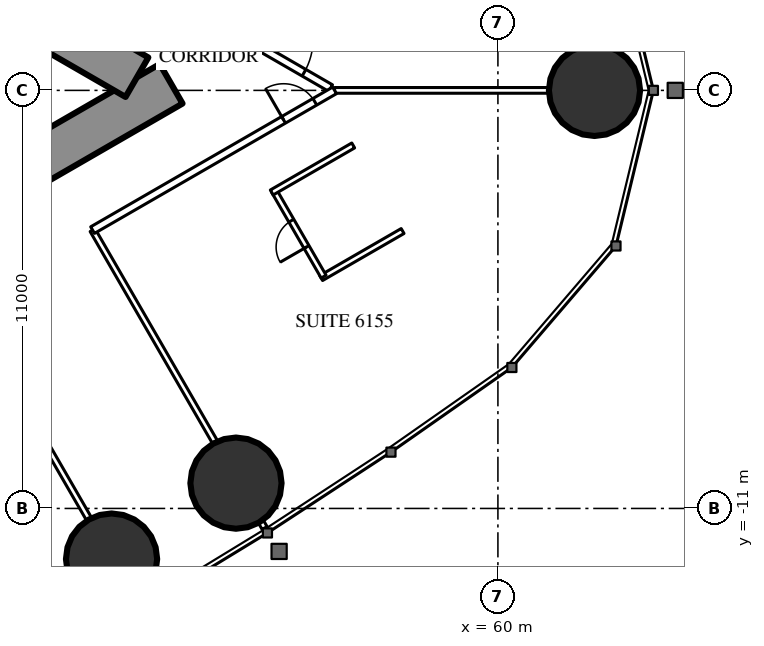
"""IFC4 building model, lengths in metres.
Left out: names, types, materials, properties, quantities, classifications, styles, units other than length and angle.
Written with IfcOpenShell. Run it as: python <this file> out.ifc"""

import sys

from ifc_helpers import new_model, si_unit, direction, frame, frame_2d, origin, origin_2d, place, context, subcontext, project, spatial, rectangle, circle, extrude, element, fill, save


model = new_model("IFC4")
c1 = context("Model", 3, precision=1e-05, world=origin(), true_north=direction((0.0, 1.0)))
c2 = subcontext(c1, "Body", "Model", "MODEL_VIEW")
j1 = project(units=[si_unit("LENGTHUNIT", "METRE"), si_unit("PLANEANGLEUNIT", "RADIAN")], contexts=[c1])
p1 = place(None, origin())
s1 = spatial("IfcSite", under=j1, at=p1, CompositionType="ELEMENT")
p2 = place(p1, origin())
s2 = spatial("IfcBuilding", under=s1, at=p2, CompositionType="ELEMENT")
p3 = place(p2, frame((0.0, 0.0, 229.7)))
s3 = spatial("IfcBuildingStorey", under=s2, at=p3, CompositionType="ELEMENT", Elevation=229.7)
for number, where, z_axis, x_axis in (
    (1, (62.542, 0.0, 0.0), (0.0, 0.0, 1.0), (1.0, 0.0, 0.0)),
    (2, (49.834, -12.332, 0.0), (0.0, 0.0, 1.0), (1.0, 0.0, 0.0)),
    (3, (53.108, -10.334, 0.0), (0.0, 0.0, 1.0), (1.0, 0.0, 0.0)),
):
    element("IfcColumn", number, at=place(p3, frame(where, z_axis=z_axis, x_axis=x_axis)), inside=s3, PredefinedType="COLUMN", context=c2, shape_type="SweptSolid", body=[
        extrude(circle(Radius=1.2, at=origin_2d()), origin(), (0.0, 0.0, 1.0), 3.6),
    ])
p4 = place(p3, frame((27.2, -13.8, 0.0), z_axis=(0.0, 0.0, 1.0), x_axis=(0.866027159892, 0.499996958321, 0.0)))
e4 = element("IfcWall", 4, at=p4, inside=s3, PredefinedType="SHEAR", context=c2, shape_type="SweptSolid", body=[
    extrude(rectangle(XDim=27.947, YDim=1.2, at=frame_2d((13.973, 0.0))), origin(), (0.0, 0.0, 1.0), 3.6),
])
p5 = place(p4, frame((4.6, 0.0, 0.0)))
e5 = element("IfcOpeningElement", 5, at=p5, cuts=e4, PredefinedType="OPENING", context=c2, shape_type="SweptSolid", body=[
    extrude(rectangle(XDim=1.0, YDim=2.2, at=frame_2d((0.5, 1.1))), frame((0.0, 0.61, 0.0), z_axis=(0.0, -1.0, 0.0), x_axis=(1.0, 0.0, 0.0)), (0.0, 0.0, 1.0), 1.22),
])
p6 = place(p4, frame((13.395, 0.0, 0.0)))
e6 = element("IfcOpeningElement", 6, at=p6, cuts=e4, PredefinedType="OPENING", context=c2, shape_type="SweptSolid", body=[
    extrude(rectangle(XDim=1.8, YDim=2.2, at=frame_2d((0.9, 1.1))), frame((0.0, 0.61, 0.0), z_axis=(0.0, -1.0, 0.0), x_axis=(1.0, 0.0, 0.0)), (0.0, 0.0, 1.0), 1.22),
])
p7 = place(p3, frame((27.2, 13.8, 0.0), z_axis=(0.0, 0.0, 1.0), x_axis=(0.866024515034, -0.500001539357, 0.0)))
e7 = element("IfcWall", 7, at=p7, inside=s3, PredefinedType="SHEAR", context=c2, shape_type="SweptSolid", body=[
    extrude(rectangle(XDim=26.907, YDim=1.2, at=frame_2d((13.454, 0.0))), origin(), (0.0, 0.0, 1.0), 3.6),
])
p8 = place(p7, frame((4.6, 0.0, 0.0)))
e8 = element("IfcOpeningElement", 8, at=p8, cuts=e7, PredefinedType="OPENING", context=c2, shape_type="SweptSolid", body=[
    extrude(rectangle(XDim=1.0, YDim=2.2, at=frame_2d((0.5, 1.1))), frame((0.0, 0.61, 0.0), z_axis=(0.0, -1.0, 0.0), x_axis=(1.0, 0.0, 0.0)), (0.0, 0.0, 1.0), 1.22),
])
p9 = place(p7, frame((13.395, 0.0, 0.0)))
e9 = element("IfcOpeningElement", 9, at=p9, cuts=e7, PredefinedType="OPENING", context=c2, shape_type="SweptSolid", body=[
    extrude(rectangle(XDim=1.8, YDim=2.2, at=frame_2d((0.9, 1.1))), frame((0.0, 0.61, 0.0), z_axis=(0.0, -1.0, 0.0), x_axis=(1.0, 0.0, 0.0)), (0.0, 0.0, 1.0), 1.22),
])
p10 = place(p3, frame((45.973, -5.617, 0.0), z_axis=(0.0, 0.0, 1.0), x_axis=(0.499985856986, -0.866033569104, 0.0)))
e10 = element("IfcWall", 10, at=p10, inside=s3, PredefinedType="PARTITIONING", context=c2, shape_type="SweptSolid", body=[
    extrude(rectangle(XDim=6.526, YDim=0.15, at=frame_2d((3.263, 0.0))), origin(), (0.0, 0.0, 1.0), 2.45),
])
p11 = place(p3, frame((49.335, -3.676, 0.0), z_axis=(0.0, 0.0, 1.0), x_axis=(0.500000613642, -0.866025049498, 0.0)))
e11 = element("IfcWall", 11, at=p11, inside=s3, PredefinedType="PARTITIONING", context=c2, shape_type="SweptSolid", body=[
    extrude(rectangle(XDim=6.433, YDim=0.15, at=frame_2d((3.216, 0.0))), origin(), (0.0, 0.0, 1.0), 2.45),
])
p12 = place(p3, frame((53.771, -11.36, 0.0), z_axis=(0.0, 0.0, 1.0), x_axis=(0.499524978789, -0.866299483762, 0.0)))
e12 = element("IfcWall", 12, at=p12, inside=s3, PredefinedType="PARTITIONING", context=c2, shape_type="SweptSolid", body=[
    extrude(rectangle(XDim=0.178, YDim=0.15, at=frame_2d((0.089, 0.0))), origin(), (0.0, 0.0, 1.0), 2.45),
])
p13 = place(p3, frame((55.702, 0.0, 0.0), z_axis=(0.0, 0.0, 1.0), x_axis=(1.0, 0.0, 0.0)))
e13 = element("IfcWall", 13, at=p13, inside=s3, PredefinedType="PARTITIONING", context=c2, shape_type="SweptSolid", body=[
    extrude(rectangle(XDim=5.619, YDim=0.15, at=frame_2d((2.81, 0.0))), origin(), (0.0, 0.0, 1.0), 2.45),
])
p14 = place(p3, frame((52.639, 1.769, 0.0), z_axis=(0.0, 0.0, 1.0), x_axis=(0.866027340901, -0.4999966448, 0.0)))
e14 = element("IfcWall", 14, at=p14, inside=s3, PredefinedType="PARTITIONING", context=c2, shape_type="SweptSolid", body=[
    extrude(rectangle(XDim=3.417, YDim=0.2, at=frame_2d((1.708, 0.0))), origin(), (0.0, 0.0, 1.0), 3.35),
])
p15 = place(p14, frame((0.809, 0.0, 0.0)))
e15 = element("IfcOpeningElement", 15, at=p15, cuts=e14, PredefinedType="OPENING", context=c2, shape_type="SweptSolid", body=[
    extrude(rectangle(XDim=1.8, YDim=2.2, at=frame_2d((0.9, 1.1))), frame((0.0, 0.11, 0.0), z_axis=(0.0, -1.0, 0.0), x_axis=(1.0, 0.0, 0.0)), (0.0, 0.0, 1.0), 0.22),
])
p16 = place(p3, frame((55.349, -4.938, 0.0), z_axis=(0.0, 0.0, 1.0), x_axis=(0.866006523861, 0.500032699561, 0.0)))
e16 = element("IfcWall", 16, at=p16, inside=s3, PredefinedType="PARTITIONING", context=c2, shape_type="SweptSolid", body=[
    extrude(rectangle(XDim=2.475, YDim=0.15, at=frame_2d((1.237, 0.0))), origin(), (0.0, 0.0, 1.0), 3.35),
])
p17 = place(p3, frame((54.114, -2.649, 0.0), z_axis=(0.0, 0.0, 1.0), x_axis=(0.500006934395, -0.866021400173, 0.0)))
e17 = element("IfcWall", 17, at=p17, inside=s3, PredefinedType="PARTITIONING", context=c2, shape_type="SweptSolid", body=[
    extrude(rectangle(XDim=2.6, YDim=0.15, at=frame_2d((1.3, 0.0))), origin(), (0.0, 0.0, 1.0), 3.35),
])
p18 = place(p17, frame((0.9, 0.0, 0.0)))
e18 = element("IfcOpeningElement", 18, at=p18, cuts=e17, PredefinedType="OPENING", context=c2, shape_type="SweptSolid", body=[
    extrude(rectangle(XDim=0.8, YDim=2.2, at=frame_2d((0.4, 1.1))), frame((0.0, 0.085, 0.0), z_axis=(0.0, -1.0, 0.0), x_axis=(1.0, 0.0, 0.0)), (0.0, 0.0, 1.0), 0.17),
])
p19 = place(p3, frame((54.049, -2.687, 0.0), z_axis=(0.0, 0.0, 1.0), x_axis=(0.866006523861, 0.500032699561, 0.0)))
e19 = element("IfcWall", 19, at=p19, inside=s3, PredefinedType="PARTITIONING", context=c2, shape_type="SweptSolid", body=[
    extrude(rectangle(XDim=2.475, YDim=0.15, at=frame_2d((1.237, 0.0))), origin(), (0.0, 0.0, 1.0), 3.35),
])
p20 = place(p3, frame((49.335, -3.676, 0.0), z_axis=(0.0, 0.0, 1.0), x_axis=(0.866021344046, 0.500007031608, 0.0)))
e20 = element("IfcWall", 20, at=p20, inside=s3, PredefinedType="PARTITIONING", context=c2, shape_type="SweptSolid", body=[
    extrude(rectangle(XDim=7.352, YDim=0.2, at=frame_2d((3.676, 0.0))), origin(), (0.0, 0.0, 1.0), 3.35),
])
p21 = place(p20, frame((5.802, 0.0, 0.0)))
e21 = element("IfcOpeningElement", 21, at=p21, cuts=e20, PredefinedType="OPENING", context=c2, shape_type="SweptSolid", body=[
    extrude(rectangle(XDim=0.95, YDim=2.2, at=frame_2d((0.475, 1.1))), frame((0.0, 0.11, 0.0), z_axis=(0.0, -1.0, 0.0), x_axis=(1.0, 0.0, 0.0)), (0.0, 0.0, 1.0), 0.22),
])
p22 = place(p18, origin())
e22 = element("IfcDoor", 22, at=p22, inside=s3, OperationType="SINGLE_SWING_RIGHT", PredefinedType="DOOR", context=c2, shape_type="SweptSolid", body=[
    extrude(rectangle(XDim=0.8, YDim=2.2, at=frame_2d((0.4, 1.1))), frame((0.0, 0.025, 0.0), z_axis=(0.0, -1.0, 0.0), x_axis=(1.0, 0.0, 0.0)), (0.0, 0.0, 1.0), 0.05),
])
fill(e18, e22)
p23 = place(p21, origin())
e23 = element("IfcDoor", 23, at=p23, inside=s3, OperationType="SINGLE_SWING_LEFT", PredefinedType="DOOR", context=c2, shape_type="SweptSolid", body=[
    extrude(rectangle(XDim=0.95, YDim=2.2, at=frame_2d((0.475, 1.1))), frame((0.0, 0.025, 0.0), z_axis=(0.0, -1.0, 0.0), x_axis=(1.0, 0.0, 0.0)), (0.0, 0.0, 1.0), 0.05),
])
fill(e21, e23)
p24 = place(p15, origin())
e24 = element("IfcDoor", 24, at=p24, inside=s3, OperationType="DOUBLE_DOOR_SINGLE_SWING", PredefinedType="DOOR", context=c2, shape_type="SweptSolid", body=[
    extrude(rectangle(XDim=1.8, YDim=2.2, at=frame_2d((0.9, 1.1))), frame((0.0, 0.025, 0.0), z_axis=(0.0, -1.0, 0.0), x_axis=(1.0, 0.0, 0.0)), (0.0, 0.0, 1.0), 0.05),
])
fill(e15, e24)
save(model, sys.argv[1])
